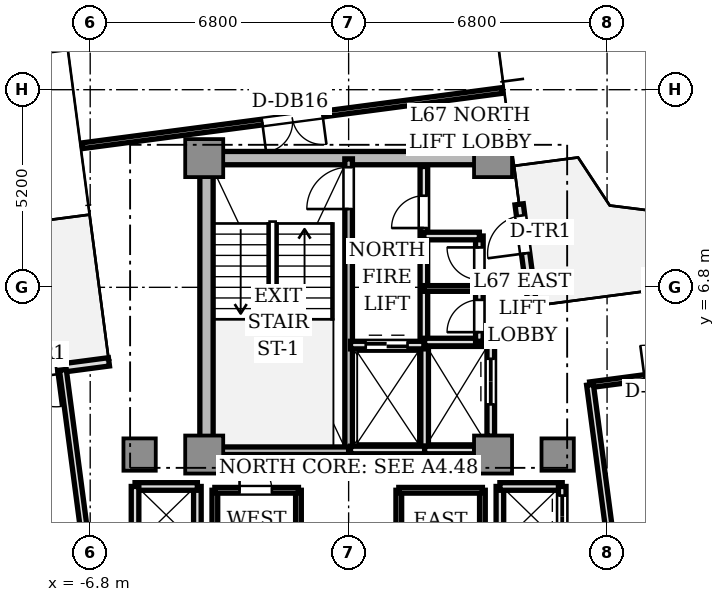
"""IFC4 building model, lengths in metres.
Left out: names, types, materials, properties, quantities, classifications, styles, units other than length and angle.
Written with IfcOpenShell. Run it as: python <this file> out.ifc"""

import sys

from ifc_helpers import new_model, si_unit, direction, frame, frame_2d, origin, origin_2d, place, context, subcontext, project, spatial, rectangle, extrude, source, transform, mapped, element, fill, save


model = new_model("IFC4")
c1 = context("Model", 3, precision=1e-05, world=origin(), true_north=direction((0.0, 1.0)))
c2 = subcontext(c1, "Body", "Model", "MODEL_VIEW")
j1 = project(units=[si_unit("LENGTHUNIT", "METRE"), si_unit("PLANEANGLEUNIT", "RADIAN")], contexts=[c1])
p1 = place(None, origin())
s1 = spatial("IfcSite", under=j1, at=p1, CompositionType="ELEMENT")
p2 = place(p1, origin())
s2 = spatial("IfcBuilding", under=s1, at=p2, CompositionType="ELEMENT")
p3 = place(p2, frame((0.0, 0.0, 241.15)))
s3 = spatial("IfcBuildingStorey", under=s2, at=p3, CompositionType="ELEMENT", Elevation=241.15)
p4 = place(p3, frame((-3.55, 10.2, 0.0), z_axis=(0.0, 0.0, 1.0), x_axis=(1.0, 0.0, 0.0)))
e1 = element("IfcWall", 1, at=p4, inside=s3, PredefinedType="SHEAR", context=c2, shape_type="SweptSolid", body=[
    extrude(rectangle(XDim=7.1, YDim=0.35, at=frame_2d((3.55, 0.0))), origin(), (0.0, 0.0, 1.0), 3.11),
])
p5 = place(p3, frame((-3.74, 2.85, 0.0), z_axis=(0.0, 0.0, 1.0), x_axis=(0.0, 1.0, 0.0)))
e2 = element("IfcWall", 2, at=p5, inside=s3, PredefinedType="SHEAR", context=c2, shape_type="SweptSolid", body=[
    extrude(rectangle(XDim=6.9, YDim=0.35, at=frame_2d((3.45, 0.0))), origin(), (0.0, 0.0, 1.0), 3.11),
])
m1 = source(origin(), c2, "Body", "SweptSolid", [
    extrude(rectangle(XDim=1.0, YDim=1.0, at=origin_2d()), origin(), (0.0, 0.0, 1.0), 3.11),
])
for number, where, z_axis, x_axis in (
    (3, (-3.8, 2.4, 0.0), (0.0, 0.0, 1.0), (1.0, 0.0, 0.0)),
    (4, (3.8, 2.4, 0.0), (0.0, 0.0, 1.0), (1.0, 0.0, 0.0)),
    (5, (-3.8, 10.2, 0.0), (0.0, 0.0, 1.0), (1.0, 0.0, 0.0)),
    (6, (3.8, 10.2, 0.0), (0.0, 0.0, 1.0), (1.0, 0.0, 0.0)),
):
    element("IfcColumn", number, at=place(p3, frame(where, z_axis=z_axis, x_axis=x_axis)), inside=s3, PredefinedType="COLUMN", context=c2, shape_type="MappedRepresentation", body=[
        mapped(m1, transform((0.0, 0.0, 0.0), scale=1.0)),
    ])
m2 = source(origin(), c2, "Body", "SweptSolid", [
    extrude(rectangle(XDim=0.85, YDim=0.85, at=origin_2d()), origin(), (0.0, 0.0, 1.0), 3.11),
])
for number, where, z_axis, x_axis in (
    (7, (5.5, 2.4, 0.0), (0.0, 0.0, 1.0), (1.0, 0.0, 0.0)),
    (8, (-5.5, 2.4, 0.0), (0.0, 0.0, 1.0), (1.0, 0.0, 0.0)),
):
    element("IfcColumn", number, at=place(p3, frame(where, z_axis=z_axis, x_axis=x_axis)), inside=s3, PredefinedType="COLUMN", context=c2, shape_type="MappedRepresentation", body=[
        mapped(m2, transform((0.0, 0.0, 0.0), scale=1.0)),
    ])
p6 = place(p3, frame((4.839, 6.307, 0.0), z_axis=(0.0, 0.0, 1.0), x_axis=(-0.130487261016, 0.991449985986, 0.0)))
e9 = element("IfcWall", 9, at=p6, inside=s3, PredefinedType="STANDARD", context=c2, shape_type="SweptSolid", body=[
    extrude(rectangle(XDim=2.7, YDim=0.22, at=frame_2d((1.35, 0.0))), origin(), (0.0, 0.0, 1.0), 3.11),
])
p7 = place(p6, frame((1.4, 0.0, 0.0)))
e10 = element("IfcOpeningElement", 10, at=p7, cuts=e9, PredefinedType="OPENING", context=c2, shape_type="SweptSolid", body=[
    extrude(rectangle(XDim=1.0, YDim=2.2, at=frame_2d((0.5, 1.1))), frame((0.0, 0.12, 0.0), z_axis=(0.0, -1.0, 0.0), x_axis=(1.0, 0.0, 0.0)), (0.0, 0.0, 1.0), 0.24),
])
p8 = place(p3, frame((-6.307, 4.839, 0.0), z_axis=(0.0, 0.0, 1.0), x_axis=(-0.991449985986, -0.130487261016, 0.0)))
e11 = element("IfcWall", 11, at=p8, inside=s3, PredefinedType="STANDARD", context=c2, shape_type="SweptSolid", body=[
    extrude(rectangle(XDim=2.7, YDim=0.22, at=frame_2d((1.35, 0.0))), origin(), (0.0, 0.0, 1.0), 3.11),
])
p9 = place(p8, frame((1.4, 0.0, 0.0)))
e12 = element("IfcOpeningElement", 12, at=p9, cuts=e11, PredefinedType="OPENING", context=c2, shape_type="SweptSolid", body=[
    extrude(rectangle(XDim=1.0, YDim=2.2, at=frame_2d((0.5, 1.1))), frame((0.0, 0.12, 0.0), z_axis=(0.0, -1.0, 0.0), x_axis=(1.0, 0.0, 0.0)), (0.0, 0.0, 1.0), 0.24),
])
p10 = place(p3, frame((0.0, 2.5, 0.0), z_axis=(0.0, 0.0, 1.0), x_axis=(0.0, 1.0, 0.0)))
e13 = element("IfcWall", 13, at=p10, inside=s3, PredefinedType="SOLIDWALL", context=c2, shape_type="SweptSolid", body=[
    extrude(rectangle(XDim=7.68, YDim=0.2, at=frame_2d((3.84, 0.0))), origin(), (0.0, 0.0, 1.0), 3.11),
])
p11 = place(p10, frame((6.36, 0.0, 0.0)))
e14 = element("IfcOpeningElement", 14, at=p11, cuts=e13, PredefinedType="OPENING", context=c2, shape_type="SweptSolid", body=[
    extrude(rectangle(XDim=1.1, YDim=2.15, at=frame_2d((0.55, 1.075))), frame((0.0, 0.11, 0.0), z_axis=(0.0, -1.0, 0.0), x_axis=(1.0, 0.0, 0.0)), (0.0, 0.0, 1.0), 0.22),
])
p12 = place(p3, frame((-3.72, 2.5, 0.0), z_axis=(0.0, 0.0, 1.0), x_axis=(1.0, 0.0, 0.0)))
e15 = element("IfcWall", 15, at=p12, inside=s3, PredefinedType="SOLIDWALL", context=c2, shape_type="SweptSolid", body=[
    extrude(rectangle(XDim=3.72, YDim=0.2, at=frame_2d((1.86, 0.0))), origin(), (0.0, 0.0, 1.0), 3.11),
])
p13 = place(p3, frame((1.98, 5.32, 0.0), z_axis=(0.0, 0.0, 1.0), x_axis=(0.0, 1.0, 0.0)))
e16 = element("IfcWall", 16, at=p13, inside=s3, PredefinedType="SOLIDWALL", context=c2, shape_type="SweptSolid", body=[
    extrude(rectangle(XDim=4.66, YDim=0.2, at=frame_2d((2.33, 0.0))), origin(), (0.0, 0.0, 1.0), 2.66),
])
p14 = place(p13, frame((3.04, 0.0, 0.0)))
e17 = element("IfcOpeningElement", 17, at=p14, cuts=e16, PredefinedType="OPENING", context=c2, shape_type="SweptSolid", body=[
    extrude(rectangle(XDim=0.85, YDim=2.1, at=frame_2d((0.425, 1.05))), frame((0.0, 0.11, 0.0), z_axis=(0.0, -1.0, 0.0), x_axis=(1.0, 0.0, 0.0)), (0.0, 0.0, 1.0), 0.22),
])
p15 = place(p3, frame((2.0, 2.5, 0.0), z_axis=(0.0, 0.0, 1.0), x_axis=(0.0, 1.0, 0.0)))
e18 = element("IfcWall", 18, at=p15, inside=s3, PredefinedType="SOLIDWALL", context=c2, shape_type="SweptSolid", body=[
    extrude(rectangle(XDim=2.78, YDim=0.2, at=frame_2d((1.39, 0.0))), origin(), (0.0, 0.0, 1.0), 2.66),
])
p16 = place(p3, frame((0.05, 2.52, 0.0), z_axis=(0.0, 0.0, 1.0), x_axis=(1.0, 0.0, 0.0)))
e19 = element("IfcWall", 19, at=p16, inside=s3, PredefinedType="SOLIDWALL", context=c2, shape_type="SweptSolid", body=[
    extrude(rectangle(XDim=1.95, YDim=0.2, at=frame_2d((0.975, 0.0))), origin(), (0.0, 0.0, 1.0), 2.66),
])
p17 = place(p3, frame((0.05, 5.28, 0.0), z_axis=(0.0, 0.0, 1.0), x_axis=(1.0, 0.0, 0.0)))
e20 = element("IfcWall", 20, at=p17, inside=s3, PredefinedType="SOLIDWALL", context=c2, shape_type="SweptSolid", body=[
    extrude(rectangle(XDim=1.93, YDim=0.2, at=frame_2d((0.965, 0.0))), origin(), (0.0, 0.0, 1.0), 2.66),
])
p18 = place(p17, frame((0.4, 0.0, 0.0)))
e21 = element("IfcOpeningElement", 21, at=p18, cuts=e20, PredefinedType="OPENING", context=c2, shape_type="SweptSolid", body=[
    extrude(rectangle(XDim=1.1, YDim=2.2, at=frame_2d((0.55, 1.1))), frame((0.0, 0.11, 0.0), z_axis=(0.0, -1.0, 0.0), x_axis=(1.0, 0.0, 0.0)), (0.0, 0.0, 1.0), 0.22),
])
p19 = place(p3, frame((2.0, 2.52, 0.0), z_axis=(0.0, 0.0, 1.0), x_axis=(1.0, 0.0, 0.0)))
e22 = element("IfcWall", 22, at=p19, inside=s3, PredefinedType="SOLIDWALL", context=c2, shape_type="SweptSolid", body=[
    extrude(rectangle(XDim=1.32, YDim=0.2, at=frame_2d((0.66, 0.0))), origin(), (0.0, 0.0, 1.0), 2.66),
])
p20 = place(p3, frame((2.0, 5.36, 0.0), z_axis=(0.0, 0.0, 1.0), x_axis=(1.0, 0.0, 0.0)))
e23 = element("IfcWall", 23, at=p20, inside=s3, PredefinedType="SOLIDWALL", context=c2, shape_type="SweptSolid", body=[
    extrude(rectangle(XDim=1.74, YDim=0.2, at=frame_2d((0.87, 0.0))), origin(), (0.0, 0.0, 1.0), 2.66),
])
p21 = place(p3, frame((3.74, 2.88, 0.0), z_axis=(0.0, 0.0, 1.0), x_axis=(0.0, 1.0, 0.0)))
e24 = element("IfcWall", 24, at=p21, inside=s3, PredefinedType="SOLIDWALL", context=c2, shape_type="SweptSolid", body=[
    extrude(rectangle(XDim=2.48, YDim=0.2, at=frame_2d((1.24, 0.0))), origin(), (0.0, 0.0, 1.0), 2.66),
])
p22 = place(p21, frame((0.84, 0.0, 0.0)))
e25 = element("IfcOpeningElement", 25, at=p22, cuts=e24, PredefinedType="OPENING", context=c2, shape_type="SweptSolid", body=[
    extrude(rectangle(XDim=1.2, YDim=2.2, at=frame_2d((0.6, 1.1))), frame((0.0, 0.11, 0.0), z_axis=(0.0, -1.0, 0.0), x_axis=(1.0, 0.0, 0.0)), (0.0, 0.0, 1.0), 0.22),
])
p23 = place(p3, frame((3.98, -1.56, 0.0), z_axis=(0.0, 0.0, 1.0), x_axis=(0.0, 1.0, 0.0)))
e26 = element("IfcWall", 26, at=p23, inside=s3, PredefinedType="SOLIDWALL", context=c2, shape_type="SweptSolid", body=[
    extrude(rectangle(XDim=3.12, YDim=0.2, at=frame_2d((1.56, 0.0))), origin(), (0.0, 0.0, 1.0), 2.33),
])
p24 = place(p3, frame((3.98, 1.56, 0.0), z_axis=(0.0, 0.0, 1.0), x_axis=(1.0, 0.0, 0.0)))
e27 = element("IfcWall", 27, at=p24, inside=s3, PredefinedType="SOLIDWALL", context=c2, shape_type="SweptSolid", body=[
    extrude(rectangle(XDim=1.64, YDim=0.2, at=frame_2d((0.82, 0.0))), origin(), (0.0, 0.0, 1.0), 2.66),
])
p25 = place(p3, frame((5.62, 0.0, 0.0), z_axis=(0.0, 0.0, 1.0), x_axis=(0.0, 1.0, 0.0)))
e28 = element("IfcWall", 28, at=p25, inside=s3, PredefinedType="SOLIDWALL", context=c2, shape_type="SweptSolid", body=[
    extrude(rectangle(XDim=1.56, YDim=0.2, at=frame_2d((0.78, 0.0))), origin(), (0.0, 0.0, 1.0), 2.66),
])
p26 = place(p25, frame((0.22, 0.0, 0.0)))
e29 = element("IfcOpeningElement", 29, at=p26, cuts=e28, PredefinedType="OPENING", context=c2, shape_type="SweptSolid", body=[
    extrude(rectangle(XDim=1.1, YDim=2.2, at=frame_2d((0.55, 1.1))), frame((0.0, 0.11, 0.0), z_axis=(0.0, -1.0, 0.0), x_axis=(1.0, 0.0, 0.0)), (0.0, 0.0, 1.0), 0.22),
])
p27 = place(p3, frame((-3.98, -1.56, 0.0), z_axis=(0.0, 0.0, 1.0), x_axis=(0.0, 1.0, 0.0)))
e30 = element("IfcWall", 30, at=p27, inside=s3, PredefinedType="SOLIDWALL", context=c2, shape_type="SweptSolid", body=[
    extrude(rectangle(XDim=3.12, YDim=0.2, at=frame_2d((1.56, 0.0))), origin(), (0.0, 0.0, 1.0), 2.33),
])
p28 = place(p3, frame((-5.62, 1.56, 0.0), z_axis=(0.0, 0.0, 1.0), x_axis=(1.0, 0.0, 0.0)))
e31 = element("IfcWall", 31, at=p28, inside=s3, PredefinedType="SOLIDWALL", context=c2, shape_type="SweptSolid", body=[
    extrude(rectangle(XDim=1.64, YDim=0.2, at=frame_2d((0.82, 0.0))), origin(), (0.0, 0.0, 1.0), 2.66),
])
p29 = place(p3, frame((-5.62, 0.0, 0.0), z_axis=(0.0, 0.0, 1.0), x_axis=(0.0, 1.0, 0.0)))
e32 = element("IfcWall", 32, at=p29, inside=s3, PredefinedType="SOLIDWALL", context=c2, shape_type="SweptSolid", body=[
    extrude(rectangle(XDim=1.56, YDim=0.2, at=frame_2d((0.78, 0.0))), origin(), (0.0, 0.0, 1.0), 2.66),
])
p30 = place(p3, frame((3.44, 5.38, 0.0), z_axis=(0.0, 0.0, 1.0), x_axis=(0.0, 1.0, 0.0)))
e33 = element("IfcWall", 33, at=p30, inside=s3, PredefinedType="SOLIDWALL", context=c2, shape_type="SweptSolid", body=[
    extrude(rectangle(XDim=2.77, YDim=0.2, at=frame_2d((1.385, 0.0))), origin(), (0.0, 0.0, 1.0), 2.66),
])
p31 = place(p30, frame((0.24, 0.0, 0.0)))
e34 = element("IfcOpeningElement", 34, at=p31, cuts=e33, PredefinedType="OPENING", context=c2, shape_type="SweptSolid", body=[
    extrude(rectangle(XDim=0.85, YDim=2.1, at=frame_2d((0.425, 1.05))), frame((0.0, 0.11, 0.0), z_axis=(0.0, -1.0, 0.0), x_axis=(1.0, 0.0, 0.0)), (0.0, 0.0, 1.0), 0.22),
])
p32 = place(p30, frame((1.62, 0.0, 0.0)))
e35 = element("IfcOpeningElement", 35, at=p32, cuts=e33, PredefinedType="OPENING", context=c2, shape_type="SweptSolid", body=[
    extrude(rectangle(XDim=0.85, YDim=2.1, at=frame_2d((0.425, 1.05))), frame((0.0, 0.11, 0.0), z_axis=(0.0, -1.0, 0.0), x_axis=(1.0, 0.0, 0.0)), (0.0, 0.0, 1.0), 0.22),
])
p33 = place(p3, frame((1.98, 8.15, 0.0), z_axis=(0.0, 0.0, 1.0), x_axis=(1.0, 0.0, 0.0)))
e36 = element("IfcWall", 36, at=p33, inside=s3, PredefinedType="SOLIDWALL", context=c2, shape_type="SweptSolid", body=[
    extrude(rectangle(XDim=1.46, YDim=0.2, at=frame_2d((0.73, 0.0))), origin(), (0.0, 0.0, 1.0), 2.66),
])
p34 = place(p3, frame((1.98, 6.77, 0.0), z_axis=(0.0, 0.0, 1.0), x_axis=(1.0, 0.0, 0.0)))
e37 = element("IfcWall", 37, at=p34, inside=s3, PredefinedType="PARTITIONING", context=c2, shape_type="SweptSolid", body=[
    extrude(rectangle(XDim=1.46, YDim=0.15, at=frame_2d((0.73, 0.0))), origin(), (0.0, 0.0, 1.0), 2.66),
])
p35 = place(p3, frame((-1.32, -1.46, 0.0), z_axis=(0.0, 0.0, 1.0), x_axis=(0.0, 1.0, 0.0)))
e38 = element("IfcWall", 38, at=p35, inside=s3, PredefinedType="PARTITIONING", context=c2, shape_type="SweptSolid", body=[
    extrude(rectangle(XDim=2.92, YDim=0.15, at=frame_2d((1.46, 0.0))), origin(), (0.0, 0.0, 1.0), 2.66),
])
p36 = place(p3, frame((-3.52, -1.46, 0.0), z_axis=(0.0, 0.0, 1.0), x_axis=(0.0, 1.0, 0.0)))
e39 = element("IfcWall", 39, at=p36, inside=s3, PredefinedType="PARTITIONING", context=c2, shape_type="SweptSolid", body=[
    extrude(rectangle(XDim=2.92, YDim=0.15, at=frame_2d((1.46, 0.0))), origin(), (0.0, 0.0, 1.0), 2.33),
])
p37 = place(p3, frame((-3.52, 1.46, 0.0), z_axis=(0.0, 0.0, 1.0), x_axis=(1.0, 0.0, 0.0)))
e40 = element("IfcWall", 40, at=p37, inside=s3, PredefinedType="PARTITIONING", context=c2, shape_type="SweptSolid", body=[
    extrude(rectangle(XDim=2.2, YDim=0.15, at=frame_2d((1.1, 0.0))), origin(), (0.0, 0.0, 1.0), 2.66),
])
p38 = place(p37, frame((0.65, 0.0, 0.0)))
e41 = element("IfcOpeningElement", 41, at=p38, cuts=e40, PredefinedType="OPENING", context=c2, shape_type="SweptSolid", body=[
    extrude(rectangle(XDim=0.85, YDim=2.1, at=frame_2d((0.425, 1.05))), frame((0.0, 0.085, 0.0), z_axis=(0.0, -1.0, 0.0), x_axis=(1.0, 0.0, 0.0)), (0.0, 0.0, 1.0), 0.17),
])
p39 = place(p3, frame((1.32, -1.46, 0.0), z_axis=(0.0, 0.0, 1.0), x_axis=(0.0, 1.0, 0.0)))
e42 = element("IfcWall", 42, at=p39, inside=s3, PredefinedType="PARTITIONING", context=c2, shape_type="SweptSolid", body=[
    extrude(rectangle(XDim=2.92, YDim=0.15, at=frame_2d((1.46, 0.0))), origin(), (0.0, 0.0, 1.0), 2.66),
])
p40 = place(p3, frame((3.52, -1.46, 0.0), z_axis=(0.0, 0.0, 1.0), x_axis=(0.0, 1.0, 0.0)))
e43 = element("IfcWall", 43, at=p40, inside=s3, PredefinedType="PARTITIONING", context=c2, shape_type="SweptSolid", body=[
    extrude(rectangle(XDim=2.92, YDim=0.15, at=frame_2d((1.46, 0.0))), origin(), (0.0, 0.0, 1.0), 2.33),
])
p41 = place(p3, frame((1.32, 1.46, 0.0), z_axis=(0.0, 0.0, 1.0), x_axis=(1.0, 0.0, 0.0)))
e44 = element("IfcWall", 44, at=p41, inside=s3, PredefinedType="PARTITIONING", context=c2, shape_type="SweptSolid", body=[
    extrude(rectangle(XDim=2.2, YDim=0.15, at=frame_2d((1.1, 0.0))), origin(), (0.0, 0.0, 1.0), 2.66),
])
p42 = place(p3, frame((6.351, 4.236, 0.0), z_axis=(0.0, 0.0, 1.0), x_axis=(0.991444946295, 0.130525547176, 0.0)))
e45 = element("IfcWall", 45, at=p42, inside=s3, PredefinedType="PARTITIONING", context=c2, shape_type="SweptSolid", body=[
    extrude(rectangle(XDim=8.357, YDim=0.15, at=frame_2d((4.179, 0.0))), origin(), (0.0, 0.0, 1.0), 2.66),
])
p43 = place(p42, frame((1.447, 0.0, 0.0)))
e46 = element("IfcOpeningElement", 46, at=p43, cuts=e45, PredefinedType="OPENING", context=c2, shape_type="SweptSolid", body=[
    extrude(rectangle(XDim=0.85, YDim=2.1, at=frame_2d((0.425, 1.05))), frame((0.0, 0.085, 0.0), z_axis=(0.0, -1.0, 0.0), x_axis=(1.0, 0.0, 0.0)), (0.0, 0.0, 1.0), 0.17),
])
p44 = place(p42, frame((4.651, 0.0, 0.0)))
e47 = element("IfcOpeningElement", 47, at=p44, cuts=e45, PredefinedType="OPENING", context=c2, shape_type="SweptSolid", body=[
    extrude(rectangle(XDim=0.85, YDim=2.1, at=frame_2d((0.425, 1.05))), frame((0.0, 0.085, 0.0), z_axis=(0.0, -1.0, 0.0), x_axis=(1.0, 0.0, 0.0)), (0.0, 0.0, 1.0), 0.17),
])
p45 = place(p3, frame((7.519, -4.629, 0.0), z_axis=(0.0, 0.0, 1.0), x_axis=(-0.130534320109, 0.991443791283, 0.0)))
e48 = element("IfcWall", 48, at=p45, inside=s3, PredefinedType="PARTITIONING", context=c2, shape_type="SweptSolid", body=[
    extrude(rectangle(XDim=8.942, YDim=0.18, at=frame_2d((4.471, 0.0))), origin(), (0.0, 0.0, 1.0), 2.66),
])
p46 = place(p3, frame((4.042, 11.98, 0.0), z_axis=(0.0, 0.0, 1.0), x_axis=(-0.991444895998, -0.130525929223, 0.0)))
e49 = element("IfcWall", 49, at=p46, inside=s3, PredefinedType="PARTITIONING", context=c2, shape_type="SweptSolid", body=[
    extrude(rectangle(XDim=11.142, YDim=0.15, at=frame_2d((5.571, 0.0))), origin(), (0.0, 0.0, 1.0), 2.66),
])
p47 = place(p46, frame((4.771, 0.0, 0.0)))
e50 = element("IfcOpeningElement", 50, at=p47, cuts=e49, PredefinedType="OPENING", context=c2, shape_type="SweptSolid", body=[
    extrude(rectangle(XDim=1.6, YDim=2.25, at=frame_2d((0.8, 1.125))), frame((0.0, 0.085, 0.0), z_axis=(0.0, -1.0, 0.0), x_axis=(1.0, 0.0, 0.0)), (0.0, 0.0, 1.0), 0.17),
])
p48 = place(p3, frame((-7.519, 4.629, 0.0), z_axis=(0.0, 0.0, 1.0), x_axis=(0.130554282615, -0.991441162798, 0.0)))
e51 = element("IfcWall", 51, at=p48, inside=s3, PredefinedType="PARTITIONING", context=c2, shape_type="SweptSolid", body=[
    extrude(rectangle(XDim=4.621, YDim=0.18, at=frame_2d((2.311, 0.0))), origin(), (0.0, 0.0, 1.0), 2.66),
])
m3 = source(origin(), c2, "Body", "SweptSolid", [
    extrude(rectangle(XDim=1.0, YDim=0.05, at=origin_2d()), origin(), (0.0, 0.0, 1.0), 2.2),
])
p49 = place(p7, frame((0.5, 0.0, 0.0)))
e52 = element("IfcDoor", 52, at=p49, inside=s3, OperationType="SINGLE_SWING_LEFT", PredefinedType="DOOR", context=c2, shape_type="MappedRepresentation", body=[
    mapped(m3, transform((0.0, 0.0, 0.0), scale=1.0)),
])
fill(e10, e52)
p50 = place(p9, frame((0.5, 0.0, 0.0)))
e53 = element("IfcDoor", 53, at=p50, inside=s3, OperationType="SINGLE_SWING_LEFT", PredefinedType="DOOR", context=c2, shape_type="MappedRepresentation", body=[
    mapped(m3, transform((0.0, 0.0, 0.0), scale=1.0)),
])
fill(e12, e53)
m4 = source(origin(), c2, "Body", "SweptSolid", [
    extrude(rectangle(XDim=1.1, YDim=0.05, at=origin_2d()), origin(), (0.0, 0.0, 1.0), 2.15),
])
p51 = place(p11, frame((0.55, 0.0, 0.0)))
e54 = element("IfcDoor", 54, at=p51, inside=s3, OperationType="SINGLE_SWING_LEFT", PredefinedType="DOOR", context=c2, shape_type="MappedRepresentation", body=[
    mapped(m4, transform((0.0, 0.0, 0.0), scale=1.0)),
])
fill(e14, e54)
m5 = source(origin(), c2, "Body", "SweptSolid", [
    extrude(rectangle(XDim=0.85, YDim=0.05, at=origin_2d()), origin(), (0.0, 0.0, 1.0), 2.1),
])
p52 = place(p14, frame((0.425, 0.0, 0.0)))
e55 = element("IfcDoor", 55, at=p52, inside=s3, OperationType="SINGLE_SWING_LEFT", PredefinedType="DOOR", context=c2, shape_type="MappedRepresentation", body=[
    mapped(m5, transform((0.0, 0.0, 0.0), scale=1.0)),
])
fill(e17, e55)
m6 = source(origin(), c2, "Body", "SweptSolid", [
    extrude(rectangle(XDim=1.1, YDim=0.05, at=origin_2d()), origin(), (0.0, 0.0, 1.0), 2.2),
])
p53 = place(p18, frame((0.55, 0.0, 0.0)))
e56 = element("IfcDoor", 56, at=p53, inside=s3, OperationType="DOUBLE_DOOR_SLIDING", PredefinedType="DOOR", context=c2, shape_type="MappedRepresentation", body=[
    mapped(m6, transform((0.0, 0.0, 0.0), scale=1.0)),
])
fill(e21, e56)
m7 = source(origin(), c2, "Body", "SweptSolid", [
    extrude(rectangle(XDim=1.2, YDim=0.05, at=origin_2d()), origin(), (0.0, 0.0, 1.0), 2.2),
])
p54 = place(p22, frame((0.6, 0.0, 0.0)))
e57 = element("IfcDoor", 57, at=p54, inside=s3, OperationType="DOUBLE_DOOR_SLIDING", PredefinedType="DOOR", context=c2, shape_type="MappedRepresentation", body=[
    mapped(m7, transform((0.0, 0.0, 0.0), scale=1.0)),
])
fill(e25, e57)
p55 = place(p26, frame((0.55, 0.0, 0.0)))
e58 = element("IfcDoor", 58, at=p55, inside=s3, OperationType="DOUBLE_DOOR_SLIDING", PredefinedType="DOOR", context=c2, shape_type="MappedRepresentation", body=[
    mapped(m6, transform((0.0, 0.0, 0.0), scale=1.0)),
])
fill(e29, e58)
p56 = place(p31, frame((0.425, 0.0, 0.0)))
e59 = element("IfcDoor", 59, at=p56, inside=s3, OperationType="SINGLE_SWING_LEFT", PredefinedType="DOOR", context=c2, shape_type="MappedRepresentation", body=[
    mapped(m5, transform((0.0, 0.0, 0.0), scale=1.0)),
])
fill(e34, e59)
p57 = place(p32, frame((0.425, 0.0, 0.0)))
e60 = element("IfcDoor", 60, at=p57, inside=s3, OperationType="SINGLE_SWING_RIGHT", PredefinedType="DOOR", context=c2, shape_type="MappedRepresentation", body=[
    mapped(m5, transform((0.0, 0.0, 0.0), scale=1.0)),
])
fill(e35, e60)
p58 = place(p38, frame((0.425, 0.0, 0.0)))
e61 = element("IfcDoor", 61, at=p58, inside=s3, OperationType="SINGLE_SWING_LEFT", PredefinedType="DOOR", context=c2, shape_type="MappedRepresentation", body=[
    mapped(m5, transform((0.0, 0.0, 0.0), scale=1.0)),
])
fill(e41, e61)
p59 = place(p43, frame((0.425, 0.0, 0.0)))
e62 = element("IfcDoor", 62, at=p59, inside=s3, OperationType="SINGLE_SWING_LEFT", PredefinedType="DOOR", context=c2, shape_type="MappedRepresentation", body=[
    mapped(m5, transform((0.0, 0.0, 0.0), scale=1.0)),
])
fill(e46, e62)
m8 = source(origin(), c2, "Body", "SweptSolid", [
    extrude(rectangle(XDim=1.6, YDim=0.05, at=origin_2d()), origin(), (0.0, 0.0, 1.0), 2.25),
])
p60 = place(p47, frame((0.8, 0.0, 0.0)))
e63 = element("IfcDoor", 63, at=p60, inside=s3, OperationType="DOUBLE_DOOR_SINGLE_SWING", PredefinedType="DOOR", context=c2, shape_type="MappedRepresentation", body=[
    mapped(m8, transform((0.0, 0.0, 0.0), scale=1.0)),
])
fill(e50, e63)
save(model, sys.argv[1])
